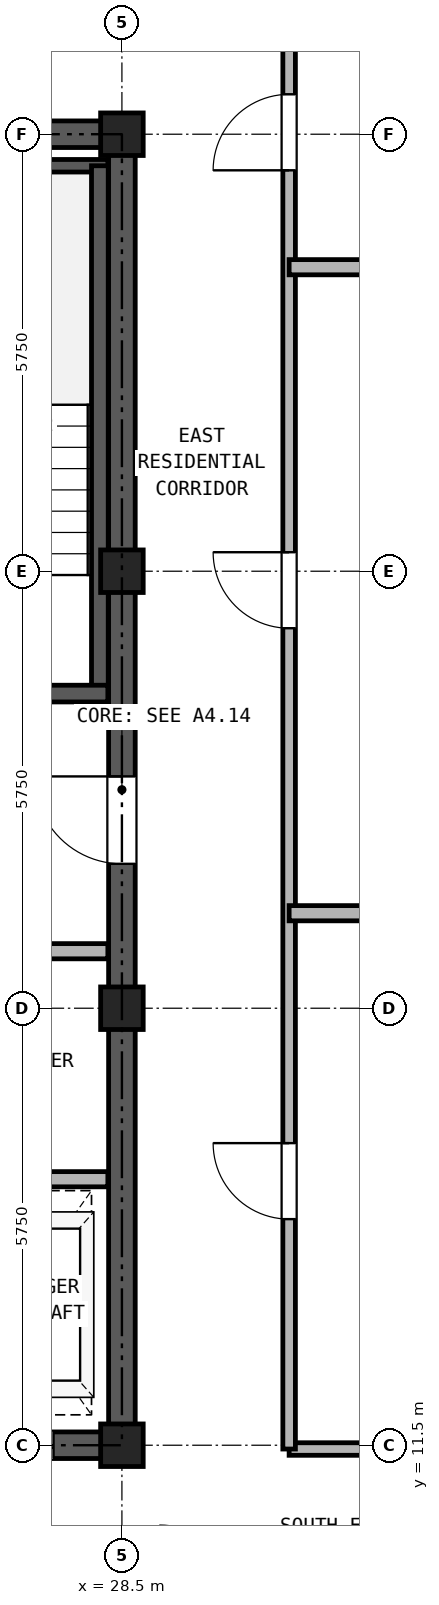
"""IFC4 building model, lengths in metres.
Left out: names, types, materials, properties, quantities, classifications, styles, units other than length and angle.
Written with IfcOpenShell. Run it as: python <this file> out.ifc"""

import sys

from ifc_helpers import new_model, si_unit, direction, frame, frame_2d, origin, origin_2d, place, context, subcontext, project, spatial, rectangle, hollow_rectangle, extrude, source, transform, mapped, element, fill, save


model = new_model("IFC4")
c1 = context("Model", 3, precision=1e-05, world=origin(), true_north=direction((0.0, 1.0)))
c2 = subcontext(c1, "Body", "Model", "MODEL_VIEW")
j1 = project(units=[si_unit("LENGTHUNIT", "METRE"), si_unit("PLANEANGLEUNIT", "RADIAN")], contexts=[c1])
p1 = place(None, origin())
s1 = spatial("IfcSite", under=j1, at=p1, CompositionType="ELEMENT")
p2 = place(p1, origin())
s2 = spatial("IfcBuilding", under=s1, at=p2, CompositionType="ELEMENT")
p3 = place(p2, frame((0.0, 0.0, 236.1)))
s3 = spatial("IfcBuildingStorey", under=s2, at=p3, CompositionType="ELEMENT", Elevation=236.1)
m1 = source(origin(), c2, "Body", "SweptSolid", [
    extrude(hollow_rectangle(XDim=0.56, YDim=0.56, WallThickness=0.03, at=origin_2d()), origin(), (0.0, 0.0, 1.0), 2.98),
])
for number, where, z_axis, x_axis in (
    (1, (28.5, 11.5, 0.0), (0.0, 0.0, 1.0), (1.0, 0.0, 0.0)),
    (2, (28.5, 17.25, 0.0), (0.0, 0.0, 1.0), (1.0, 0.0, 0.0)),
    (3, (28.5, 23.0, 0.0), (0.0, 0.0, 1.0), (1.0, 0.0, 0.0)),
    (4, (28.5, 28.75, 0.0), (0.0, 0.0, 1.0), (1.0, 0.0, 0.0)),
):
    element("IfcColumn", number, at=place(p3, frame(where, z_axis=z_axis, x_axis=x_axis)), inside=s3, PredefinedType="COLUMN", context=c2, shape_type="MappedRepresentation", body=[
        mapped(m1, transform((0.0, 0.0, 0.0), x_axis=(1.0, 0.0, 0.0), y_axis=(0.0, 1.0, 0.0), z_axis=(0.0, 0.0, 1.0), scale=1.0)),
    ])
p4 = place(p3, frame((18.325, 11.5, 0.0), z_axis=(0.0, 0.0, 1.0), x_axis=(1.0, 0.0, 0.0)))
e5 = element("IfcWall", 5, at=p4, inside=s3, PredefinedType="SHEAR", context=c2, shape_type="SweptSolid", body=[
    extrude(rectangle(XDim=10.35, YDim=0.35, at=frame_2d((5.175, 0.0))), origin(), (0.0, 0.0, 1.0), 2.98),
])
p5 = place(p4, frame((1.775, 0.0, 0.0)))
e6 = element("IfcOpeningElement", 6, at=p5, cuts=e5, PredefinedType="OPENING", context=c2, shape_type="SweptSolid", body=[
    extrude(rectangle(XDim=0.95, YDim=2.15, at=frame_2d((0.475, 1.075))), frame((0.0, 0.185, 0.0), z_axis=(0.0, -1.0, 0.0), x_axis=(1.0, 0.0, 0.0)), (0.0, 0.0, 1.0), 0.37),
])
p6 = place(p4, frame((5.275, 0.0, 0.0)))
e7 = element("IfcOpeningElement", 7, at=p6, cuts=e5, PredefinedType="OPENING", context=c2, shape_type="SweptSolid", body=[
    extrude(rectangle(XDim=0.95, YDim=2.15, at=frame_2d((0.475, 1.075))), frame((0.0, 0.185, 0.0), z_axis=(0.0, -1.0, 0.0), x_axis=(1.0, 0.0, 0.0)), (0.0, 0.0, 1.0), 0.37),
])
p7 = place(p4, frame((8.175, 0.0, 0.0)))
e8 = element("IfcOpeningElement", 8, at=p7, cuts=e5, PredefinedType="OPENING", context=c2, shape_type="SweptSolid", body=[
    extrude(rectangle(XDim=1.1, YDim=2.25, at=frame_2d((0.55, 1.125))), frame((0.0, 0.185, 0.0), z_axis=(0.0, -1.0, 0.0), x_axis=(1.0, 0.0, 0.0)), (0.0, 0.0, 1.0), 0.37),
])
p8 = place(p3, frame((18.325, 28.75, 0.0), z_axis=(0.0, 0.0, 1.0), x_axis=(1.0, 0.0, 0.0)))
e9 = element("IfcWall", 9, at=p8, inside=s3, PredefinedType="SHEAR", context=c2, shape_type="SweptSolid", body=[
    extrude(rectangle(XDim=10.35, YDim=0.35, at=frame_2d((5.175, 0.0))), origin(), (0.0, 0.0, 1.0), 2.98),
])
p9 = place(p8, frame((4.055, 0.0, 0.0)))
e10 = element("IfcOpeningElement", 10, at=p9, cuts=e9, PredefinedType="OPENING", context=c2, shape_type="SweptSolid", body=[
    extrude(rectangle(XDim=0.9, YDim=2.05, at=frame_2d((0.45, 1.025))), frame((0.0, 0.185, 0.0), z_axis=(0.0, -1.0, 0.0), x_axis=(1.0, 0.0, 0.0)), (0.0, 0.0, 1.0), 0.37),
])
p10 = place(p8, frame((5.595, 0.0, 0.0)))
e11 = element("IfcOpeningElement", 11, at=p10, cuts=e9, PredefinedType="OPENING", context=c2, shape_type="SweptSolid", body=[
    extrude(rectangle(XDim=0.9, YDim=2.05, at=frame_2d((0.45, 1.025))), frame((0.0, 0.185, 0.0), z_axis=(0.0, -1.0, 0.0), x_axis=(1.0, 0.0, 0.0)), (0.0, 0.0, 1.0), 0.37),
])
p11 = place(p3, frame((28.5, 11.675, 0.0), z_axis=(0.0, 0.0, 1.0), x_axis=(0.0, 1.0, 0.0)))
e12 = element("IfcWall", 12, at=p11, inside=s3, PredefinedType="SHEAR", context=c2, shape_type="SweptSolid", body=[
    extrude(rectangle(XDim=16.9, YDim=0.35, at=frame_2d((8.45, 0.0))), origin(), (0.0, 0.0, 1.0), 2.98),
])
p12 = place(p11, frame((7.475, 0.0, 0.0)))
e13 = element("IfcOpeningElement", 13, at=p12, cuts=e12, PredefinedType="OPENING", context=c2, shape_type="SweptSolid", body=[
    extrude(rectangle(XDim=1.15, YDim=2.2, at=frame_2d((0.575, 1.1))), frame((0.0, 0.185, 0.0), z_axis=(0.0, -1.0, 0.0), x_axis=(1.0, 0.0, 0.0)), (0.0, 0.0, 1.0), 0.37),
])
p13 = place(p3, frame((25.13, 28.335, 0.0), z_axis=(0.0, 0.0, 1.0), x_axis=(1.0, 0.0, 0.0)))
e14 = element("IfcWall", 14, at=p13, inside=s3, PredefinedType="PARTITIONING", context=c2, shape_type="SweptSolid", body=[
    extrude(rectangle(XDim=3.185, YDim=0.165, at=frame_2d((1.593, 0.0))), origin(), (0.0, 0.0, 1.0), 2.98),
])
p14 = place(p3, frame((28.21, 21.39, 0.0), z_axis=(0.0, 0.0, 1.0), x_axis=(0.0, 1.0, 0.0)))
e15 = element("IfcWall", 15, at=p14, inside=s3, PredefinedType="SOLIDWALL", context=c2, shape_type="SweptSolid", body=[
    extrude(rectangle(XDim=6.945, YDim=0.22, at=frame_2d((3.473, 0.0))), origin(), (0.0, 0.0, 1.0), 2.98),
])
p15 = place(p3, frame((25.13, 21.39, 0.0), z_axis=(0.0, 0.0, 1.0), x_axis=(1.0, 0.0, 0.0)))
e16 = element("IfcWall", 16, at=p15, inside=s3, PredefinedType="SOLIDWALL", context=c2, shape_type="SweptSolid", body=[
    extrude(rectangle(XDim=3.185, YDim=0.22, at=frame_2d((1.593, 0.0))), origin(), (0.0, 0.0, 1.0), 2.98),
])
p16 = place(p15, frame((0.92, 0.0, 0.0)))
e17 = element("IfcOpeningElement", 17, at=p16, cuts=e16, PredefinedType="OPENING", context=c2, shape_type="SweptSolid", body=[
    extrude(rectangle(XDim=1.15, YDim=2.2, at=frame_2d((0.575, 1.1))), frame((0.0, 0.12, 0.0), z_axis=(0.0, -1.0, 0.0), x_axis=(1.0, 0.0, 0.0)), (0.0, 0.0, 1.0), 0.24),
])
p17 = place(p3, frame((18.685, 18.0, 0.0), z_axis=(0.0, 0.0, 1.0), x_axis=(1.0, 0.0, 0.0)))
e18 = element("IfcWall", 18, at=p17, inside=s3, PredefinedType="PARTITIONING", context=c2, shape_type="SweptSolid", body=[
    extrude(rectangle(XDim=9.63, YDim=0.2, at=frame_2d((4.815, 0.0))), origin(), (0.0, 0.0, 1.0), 2.98),
])
p18 = place(p17, frame((0.565, 0.0, 0.0)))
e19 = element("IfcOpeningElement", 19, at=p18, cuts=e18, PredefinedType="OPENING", context=c2, shape_type="SweptSolid", body=[
    extrude(rectangle(XDim=1.3, YDim=2.3, at=frame_2d((0.65, 1.15))), frame((0.0, 0.11, 0.0), z_axis=(0.0, -1.0, 0.0), x_axis=(1.0, 0.0, 0.0)), (0.0, 0.0, 1.0), 0.22),
])
p19 = place(p17, frame((2.665, 0.0, 0.0)))
e20 = element("IfcOpeningElement", 20, at=p19, cuts=e18, PredefinedType="OPENING", context=c2, shape_type="SweptSolid", body=[
    extrude(rectangle(XDim=1.3, YDim=2.3, at=frame_2d((0.65, 1.15))), frame((0.0, 0.11, 0.0), z_axis=(0.0, -1.0, 0.0), x_axis=(1.0, 0.0, 0.0)), (0.0, 0.0, 1.0), 0.22),
])
p20 = place(p17, frame((5.065, 0.0, 0.0)))
e21 = element("IfcOpeningElement", 21, at=p20, cuts=e18, PredefinedType="OPENING", context=c2, shape_type="SweptSolid", body=[
    extrude(rectangle(XDim=0.9, YDim=2.05, at=frame_2d((0.45, 1.025))), frame((0.0, 0.11, 0.0), z_axis=(0.0, -1.0, 0.0), x_axis=(1.0, 0.0, 0.0)), (0.0, 0.0, 1.0), 0.22),
])
p21 = place(p17, frame((7.765, 0.0, 0.0)))
e22 = element("IfcOpeningElement", 22, at=p21, cuts=e18, PredefinedType="OPENING", context=c2, shape_type="SweptSolid", body=[
    extrude(rectangle(XDim=0.9, YDim=2.05, at=frame_2d((0.45, 1.025))), frame((0.0, 0.11, 0.0), z_axis=(0.0, -1.0, 0.0), x_axis=(1.0, 0.0, 0.0)), (0.0, 0.0, 1.0), 0.22),
])
p22 = place(p3, frame((18.685, 15.0, 0.0), z_axis=(0.0, 0.0, 1.0), x_axis=(1.0, 0.0, 0.0)))
e23 = element("IfcWall", 23, at=p22, inside=s3, PredefinedType="PARTITIONING", context=c2, shape_type="SweptSolid", body=[
    extrude(rectangle(XDim=9.63, YDim=0.2, at=frame_2d((4.815, 0.0))), origin(), (0.0, 0.0, 1.0), 2.98),
])
p23 = place(p3, frame((30.7, 11.45, 0.0), z_axis=(0.0, 0.0, 1.0), x_axis=(1.0, 0.0, 0.0)))
e24 = element("IfcWall", 24, at=p23, inside=s3, PredefinedType="PARTITIONING", context=c2, shape_type="SweptSolid", body=[
    extrude(rectangle(XDim=7.5, YDim=0.165, at=frame_2d((3.75, 0.0))), origin(), (0.0, 0.0, 1.0), 2.428),
])
p24 = place(p3, frame((30.7, 11.45, 0.0), z_axis=(0.0, 0.0, 1.0), x_axis=(0.0, 1.0, 0.0)))
e25 = element("IfcWall", 25, at=p24, inside=s3, PredefinedType="PARTITIONING", context=c2, shape_type="SweptSolid", body=[
    extrude(rectangle(XDim=23.69, YDim=0.165, at=frame_2d((11.845, 0.0))), origin(), (0.0, 0.0, 1.0), 2.98),
])
p25 = place(p24, frame((3.025, 0.0, 0.0)))
e26 = element("IfcOpeningElement", 26, at=p25, cuts=e25, PredefinedType="OPENING", context=c2, shape_type="SweptSolid", body=[
    extrude(rectangle(XDim=1.0, YDim=2.15, at=frame_2d((0.5, 1.075))), frame((0.0, 0.093, 0.0), z_axis=(0.0, -1.0, 0.0), x_axis=(1.0, 0.0, 0.0)), (0.0, 0.0, 1.0), 0.185),
])
p26 = place(p24, frame((10.8, 0.0, 0.0)))
e27 = element("IfcOpeningElement", 27, at=p26, cuts=e25, PredefinedType="OPENING", context=c2, shape_type="SweptSolid", body=[
    extrude(rectangle(XDim=1.0, YDim=2.15, at=frame_2d((0.5, 1.075))), frame((0.0, 0.093, 0.0), z_axis=(0.0, -1.0, 0.0), x_axis=(1.0, 0.0, 0.0)), (0.0, 0.0, 1.0), 0.185),
])
p27 = place(p24, frame((16.825, 0.0, 0.0)))
e28 = element("IfcOpeningElement", 28, at=p27, cuts=e25, PredefinedType="OPENING", context=c2, shape_type="SweptSolid", body=[
    extrude(rectangle(XDim=1.0, YDim=2.15, at=frame_2d((0.5, 1.075))), frame((0.0, 0.093, 0.0), z_axis=(0.0, -1.0, 0.0), x_axis=(1.0, 0.0, 0.0)), (0.0, 0.0, 1.0), 0.185),
])
for number, where, z_axis, x_axis in (
    (29, (30.7, 18.5, 0.0), (0.0, 0.0, 1.0), (1.0, 0.0, 0.0)),
    (30, (30.7, 27.0, 0.0), (0.0, 0.0, 1.0), (1.0, 0.0, 0.0)),
):
    element("IfcWall", number, at=place(p3, frame(where, z_axis=z_axis, x_axis=x_axis)), inside=s3, PredefinedType="PARTITIONING", context=c2, shape_type="SweptSolid", body=[
        extrude(rectangle(XDim=10.94, YDim=0.2, at=frame_2d((5.47, 0.0))), origin(), (0.0, 0.0, 1.0), 2.98),
    ])
p28 = place(p12, origin())
e31 = element("IfcDoor", 31, at=p28, inside=s3, OperationType="SINGLE_SWING_RIGHT", PredefinedType="DOOR", context=c2, shape_type="SweptSolid", body=[
    extrude(rectangle(XDim=1.15, YDim=2.2, at=frame_2d((0.575, 1.1))), frame((0.0, 0.025, 0.0), z_axis=(0.0, -1.0, 0.0), x_axis=(1.0, 0.0, 0.0)), (0.0, 0.0, 1.0), 0.05),
])
fill(e13, e31)
p29 = place(p7, frame((1.1, 0.0, 0.0), z_axis=(0.0, 0.0, 1.0), x_axis=(-1.0, 0.0, 0.0)))
e32 = element("IfcDoor", 32, at=p29, inside=s3, OperationType="DOUBLE_DOOR_SLIDING", PredefinedType="DOOR", context=c2, shape_type="SweptSolid", body=[
    extrude(rectangle(XDim=1.1, YDim=2.25, at=frame_2d((0.55, 1.125))), frame((0.0, 0.025, 0.0), z_axis=(0.0, -1.0, 0.0), x_axis=(1.0, 0.0, 0.0)), (0.0, 0.0, 1.0), 0.05),
])
fill(e8, e32)
p30 = place(p25, frame((1.0, 0.0, 0.0), z_axis=(0.0, 0.0, 1.0), x_axis=(-1.0, 0.0, 0.0)))
e33 = element("IfcDoor", 33, at=p30, inside=s3, OperationType="SINGLE_SWING_RIGHT", PredefinedType="DOOR", context=c2, shape_type="SweptSolid", body=[
    extrude(rectangle(XDim=1.0, YDim=2.15, at=frame_2d((0.5, 1.075))), frame((0.0, 0.025, 0.0), z_axis=(0.0, -1.0, 0.0), x_axis=(1.0, 0.0, 0.0)), (0.0, 0.0, 1.0), 0.05),
])
fill(e26, e33)
p31 = place(p26, frame((1.0, 0.0, 0.0), z_axis=(0.0, 0.0, 1.0), x_axis=(-1.0, 0.0, 0.0)))
e34 = element("IfcDoor", 34, at=p31, inside=s3, OperationType="SINGLE_SWING_RIGHT", PredefinedType="DOOR", context=c2, shape_type="SweptSolid", body=[
    extrude(rectangle(XDim=1.0, YDim=2.15, at=frame_2d((0.5, 1.075))), frame((0.0, 0.025, 0.0), z_axis=(0.0, -1.0, 0.0), x_axis=(1.0, 0.0, 0.0)), (0.0, 0.0, 1.0), 0.05),
])
fill(e27, e34)
p32 = place(p27, frame((1.0, 0.0, 0.0), z_axis=(0.0, 0.0, 1.0), x_axis=(-1.0, 0.0, 0.0)))
e35 = element("IfcDoor", 35, at=p32, inside=s3, OperationType="SINGLE_SWING_LEFT", PredefinedType="DOOR", context=c2, shape_type="SweptSolid", body=[
    extrude(rectangle(XDim=1.0, YDim=2.15, at=frame_2d((0.5, 1.075))), frame((0.0, 0.025, 0.0), z_axis=(0.0, -1.0, 0.0), x_axis=(1.0, 0.0, 0.0)), (0.0, 0.0, 1.0), 0.05),
])
fill(e28, e35)
save(model, sys.argv[1])
